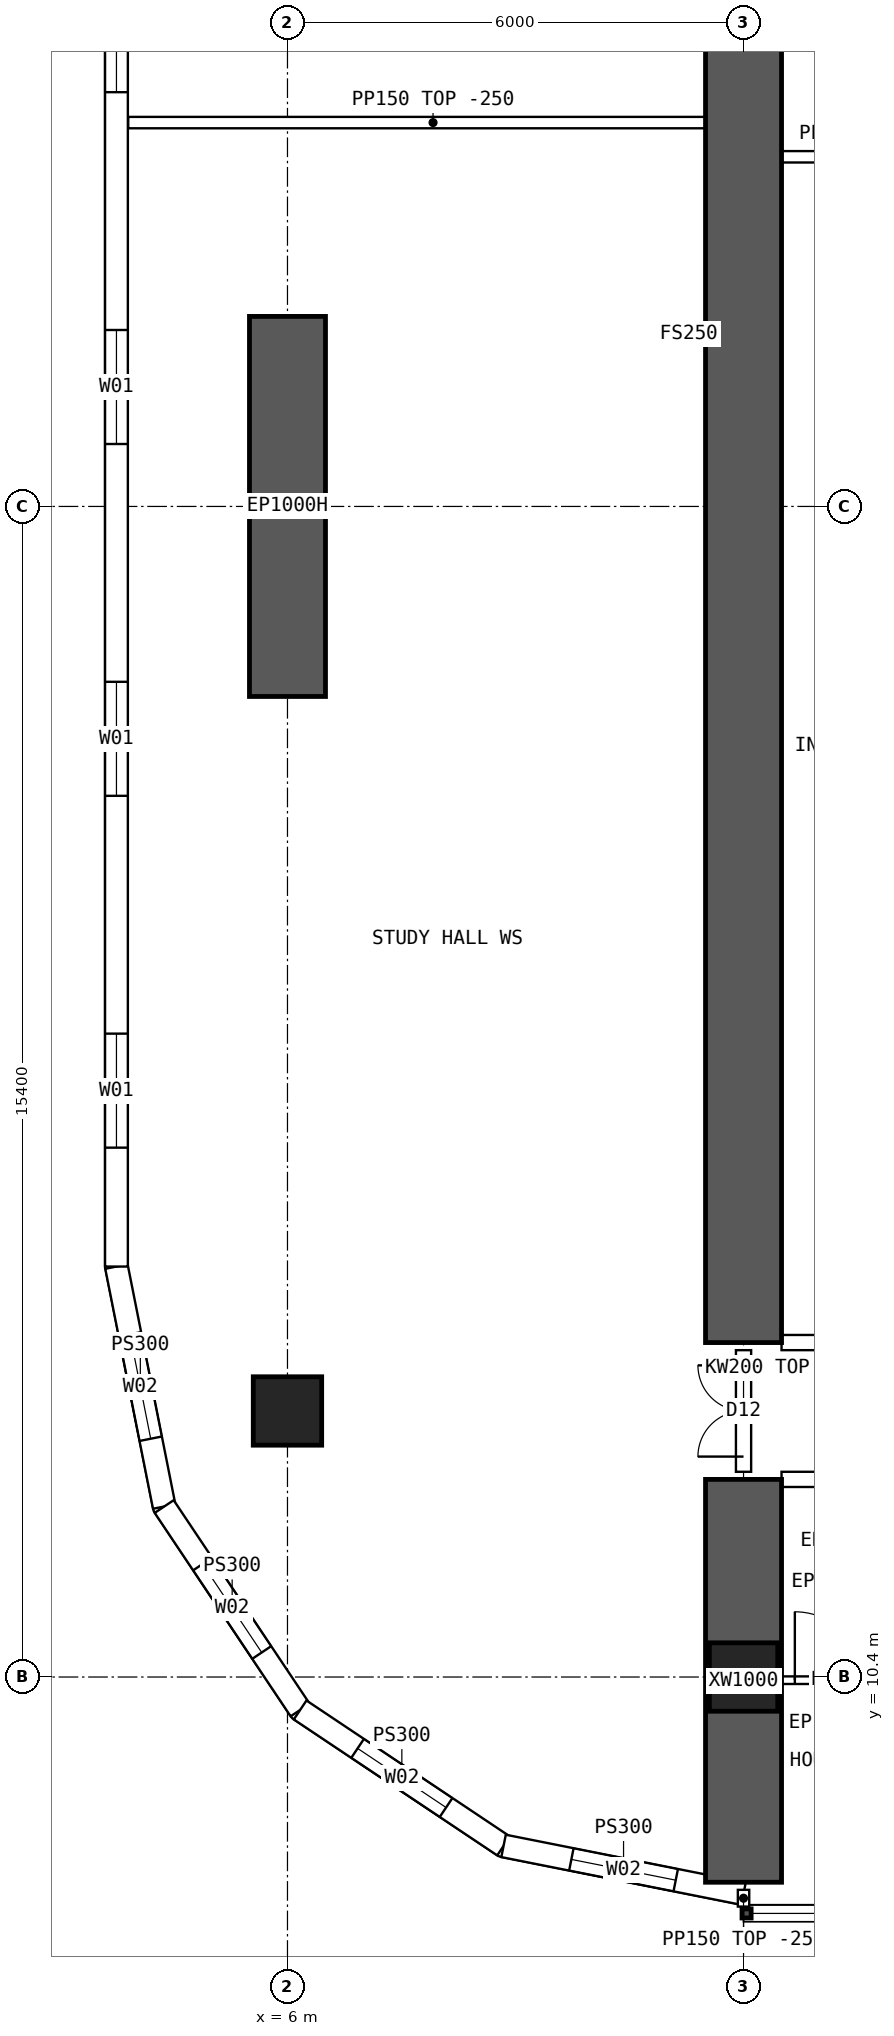
"""IFC4 building model, lengths in metres.
Left out: names, types, materials, properties, quantities, classifications, styles, units other than length and angle.
Written with IfcOpenShell. Run it as: python <this file> out.ifc"""

import sys

from ifc_helpers import new_model, si_unit, direction, frame, frame_2d, origin, origin_2d, place, context, subcontext, project, spatial, polyline, rectangle, hollow_rectangle, outline, extrude, element, fill, save


model = new_model("IFC4")
c1 = context("Model", 3, precision=1e-05, world=origin(), true_north=direction((0.0, 1.0)))
c2 = subcontext(c1, "Body", "Model", "MODEL_VIEW")
j1 = project(units=[si_unit("LENGTHUNIT", "METRE"), si_unit("PLANEANGLEUNIT", "RADIAN")], contexts=[c1])
p1 = place(None, origin())
s1 = spatial("IfcSite", under=j1, at=p1, CompositionType="ELEMENT")
p2 = place(p1, origin())
s2 = spatial("IfcBuilding", under=s1, at=p2, CompositionType="ELEMENT")
p3 = place(p2, frame((0.0, 0.0, 61.45)))
s3 = spatial("IfcBuildingStorey", under=s2, at=p3, CompositionType="ELEMENT", Elevation=61.45)
for number, where, z_axis, x_axis in (
    (1, (12.0, 10.4, 0.0), (0.0, 0.0, 1.0), (1.0, 0.0, 0.0)),
    (2, (6.0, 13.9, 0.0), (0.0, 0.0, 1.0), (1.0, 0.0, 0.0)),
):
    element("IfcColumn", number, at=place(p3, frame(where, z_axis=z_axis, x_axis=x_axis)), inside=s3, PredefinedType="COLUMN", context=c2, shape_type="SweptSolid", body=[
        extrude(hollow_rectangle(XDim=0.9, YDim=0.9, WallThickness=0.09, at=origin_2d()), origin(), (0.0, 0.0, 1.0), 3.75),
    ])
p4 = place(p3, frame((6.0, 23.3, 0.0), z_axis=(0.0, 0.0, 1.0), x_axis=(0.0, 1.0, 0.0)))
e3 = element("IfcWall", 3, at=p4, inside=s3, PredefinedType="SHEAR", context=c2, shape_type="SweptSolid", body=[
    extrude(rectangle(XDim=5.0, YDim=1.0, at=frame_2d((2.5, 0.0))), origin(), (0.0, 0.0, 1.0), 3.75),
])
p5 = place(p3, frame((12.0, 7.7, 0.0), z_axis=(0.0, 0.0, 1.0), x_axis=(0.0, 1.0, 0.0)))
e4 = element("IfcWall", 4, at=p5, inside=s3, PredefinedType="SHEAR", context=c2, shape_type="SweptSolid", body=[
    extrude(rectangle(XDim=5.3, YDim=1.0, at=frame_2d((2.65, 0.0))), origin(), (0.0, 0.0, 1.0), 3.75),
])
p6 = place(p3, frame((12.0, 14.8, 0.0), z_axis=(0.0, 0.0, 1.0), x_axis=(0.0, 1.0, 0.0)))
e5 = element("IfcWall", 5, at=p6, inside=s3, PredefinedType="SHEAR", context=c2, shape_type="SweptSolid", body=[
    extrude(rectangle(XDim=34.4, YDim=1.0, at=frame_2d((17.2, 0.0))), origin(), (0.0, 0.0, 1.0), 3.75),
])
p7 = place(p3, frame((3.75, 48.2, 0.0), z_axis=(0.0, 0.0, 1.0), x_axis=(0.0, -1.0, 0.0)))
e6 = element("IfcWall", 6, at=p7, inside=s3, PredefinedType="SOLIDWALL", context=c2, shape_type="SweptSolid", body=[
    extrude(outline(polyline([(-0.015, -0.15), (32.415, -0.15), (32.385, 0.15), (0.015, 0.15), (-0.015, -0.15)])), origin(), (0.0, 0.0, 1.0), 3.5),
])
p8 = place(p7, frame((1.564, 0.0, 0.9)))
e7 = element("IfcOpeningElement", 7, at=p8, cuts=e6, PredefinedType="OPENING", context=c2, shape_type="SweptSolid", body=[
    extrude(rectangle(XDim=1.5, YDim=2.0, at=frame_2d((0.75, 1.0))), frame((0.0, 0.16, 0.0), z_axis=(0.0, -1.0, 0.0), x_axis=(1.0, 0.0, 0.0)), (0.0, 0.0, 1.0), 0.32),
])
p9 = place(p7, frame((6.193, 0.0, 0.9)))
e8 = element("IfcOpeningElement", 8, at=p9, cuts=e6, PredefinedType="OPENING", context=c2, shape_type="SweptSolid", body=[
    extrude(rectangle(XDim=1.5, YDim=2.0, at=frame_2d((0.75, 1.0))), frame((0.0, 0.16, 0.0), z_axis=(0.0, -1.0, 0.0), x_axis=(1.0, 0.0, 0.0)), (0.0, 0.0, 1.0), 0.32),
])
p10 = place(p7, frame((10.822, 0.0, 0.9)))
e9 = element("IfcOpeningElement", 9, at=p10, cuts=e6, PredefinedType="OPENING", context=c2, shape_type="SweptSolid", body=[
    extrude(rectangle(XDim=1.5, YDim=2.0, at=frame_2d((0.75, 1.0))), frame((0.0, 0.16, 0.0), z_axis=(0.0, -1.0, 0.0), x_axis=(1.0, 0.0, 0.0)), (0.0, 0.0, 1.0), 0.32),
])
p11 = place(p7, frame((15.45, 0.0, 0.9)))
e10 = element("IfcOpeningElement", 10, at=p11, cuts=e6, PredefinedType="OPENING", context=c2, shape_type="SweptSolid", body=[
    extrude(rectangle(XDim=1.5, YDim=2.0, at=frame_2d((0.75, 1.0))), frame((0.0, 0.16, 0.0), z_axis=(0.0, -1.0, 0.0), x_axis=(1.0, 0.0, 0.0)), (0.0, 0.0, 1.0), 0.32),
])
p12 = place(p7, frame((20.079, 0.0, 0.9)))
e11 = element("IfcOpeningElement", 11, at=p12, cuts=e6, PredefinedType="OPENING", context=c2, shape_type="SweptSolid", body=[
    extrude(rectangle(XDim=1.5, YDim=2.0, at=frame_2d((0.75, 1.0))), frame((0.0, 0.16, 0.0), z_axis=(0.0, -1.0, 0.0), x_axis=(1.0, 0.0, 0.0)), (0.0, 0.0, 1.0), 0.32),
])
p13 = place(p7, frame((24.707, 0.0, 0.9)))
e12 = element("IfcOpeningElement", 12, at=p13, cuts=e6, PredefinedType="OPENING", context=c2, shape_type="SweptSolid", body=[
    extrude(rectangle(XDim=1.5, YDim=2.0, at=frame_2d((0.75, 1.0))), frame((0.0, 0.16, 0.0), z_axis=(0.0, -1.0, 0.0), x_axis=(1.0, 0.0, 0.0)), (0.0, 0.0, 1.0), 0.32),
])
p14 = place(p7, frame((29.336, 0.0, 0.9)))
e13 = element("IfcOpeningElement", 13, at=p14, cuts=e6, PredefinedType="OPENING", context=c2, shape_type="SweptSolid", body=[
    extrude(rectangle(XDim=1.5, YDim=2.0, at=frame_2d((0.75, 1.0))), frame((0.0, 0.16, 0.0), z_axis=(0.0, -1.0, 0.0), x_axis=(1.0, 0.0, 0.0)), (0.0, 0.0, 1.0), 0.32),
])
p15 = place(p3, frame((3.75, 15.8, 0.0), z_axis=(0.0, 0.0, 1.0), x_axis=(0.195065901187, -0.980790137692, 0.0)))
e14 = element("IfcWall", 14, at=p15, inside=s3, PredefinedType="SOLIDWALL", context=c2, shape_type="SweptSolid", body=[
    extrude(outline(polyline([(-0.015, -0.15), (3.249, -0.15), (3.189, 0.15), (0.015, 0.15), (-0.015, -0.15)])), origin(), (0.0, 0.0, 1.0), 3.5),
])
p16 = place(p15, frame((0.909, 0.0, 0.9)))
e15 = element("IfcOpeningElement", 15, at=p16, cuts=e14, PredefinedType="OPENING", context=c2, shape_type="SweptSolid", body=[
    extrude(rectangle(XDim=1.4, YDim=1.8, at=frame_2d((0.7, 0.9))), frame((0.0, 0.16, 0.0), z_axis=(0.0, -1.0, 0.0), x_axis=(1.0, 0.0, 0.0)), (0.0, 0.0, 1.0), 0.32),
])
p17 = place(p3, frame((4.378, 12.643, 0.0), z_axis=(0.0, 0.0, 1.0), x_axis=(0.555609954424, -0.831443069936, 0.0)))
e16 = element("IfcWall", 16, at=p17, inside=s3, PredefinedType="SOLIDWALL", context=c2, shape_type="SweptSolid", body=[
    extrude(outline(polyline([(-0.03, -0.15), (3.249, -0.15), (3.189, 0.15), (0.03, 0.15), (-0.03, -0.15)])), origin(), (0.0, 0.0, 1.0), 3.5),
])
p18 = place(p17, frame((0.909, 0.0, 0.9)))
e17 = element("IfcOpeningElement", 17, at=p18, cuts=e16, PredefinedType="OPENING", context=c2, shape_type="SweptSolid", body=[
    extrude(rectangle(XDim=1.4, YDim=1.8, at=frame_2d((0.7, 0.9))), frame((0.0, 0.16, 0.0), z_axis=(0.0, -1.0, 0.0), x_axis=(1.0, 0.0, 0.0)), (0.0, 0.0, 1.0), 0.32),
])
p19 = place(p3, frame((6.167, 9.966, 0.0), z_axis=(0.0, 0.0, 1.0), x_axis=(0.831478105043, -0.555557522525, 0.0)))
e18 = element("IfcWall", 18, at=p19, inside=s3, PredefinedType="SOLIDWALL", context=c2, shape_type="SweptSolid", body=[
    extrude(outline(polyline([(-0.03, -0.15), (3.249, -0.15), (3.189, 0.15), (0.03, 0.15), (-0.03, -0.15)])), origin(), (0.0, 0.0, 1.0), 3.5),
])
p20 = place(p19, frame((0.909, 0.0, 0.9)))
e19 = element("IfcOpeningElement", 19, at=p20, cuts=e18, PredefinedType="OPENING", context=c2, shape_type="SweptSolid", body=[
    extrude(rectangle(XDim=1.4, YDim=1.8, at=frame_2d((0.7, 0.9))), frame((0.0, 0.16, 0.0), z_axis=(0.0, -1.0, 0.0), x_axis=(1.0, 0.0, 0.0)), (0.0, 0.0, 1.0), 0.32),
])
p21 = place(p3, frame((8.843, 8.178, 0.0), z_axis=(0.0, 0.0, 1.0), x_axis=(0.980787251524, -0.195080412259, 0.0)))
e20 = element("IfcWall", 20, at=p21, inside=s3, PredefinedType="SOLIDWALL", context=c2, shape_type="SweptSolid", body=[
    extrude(outline(polyline([(-0.03, -0.15), (3.249, -0.15), (3.189, 0.15), (0.03, 0.15), (-0.03, -0.15)])), origin(), (0.0, 0.0, 1.0), 3.5),
])
p22 = place(p21, frame((0.909, 0.0, 0.9)))
e21 = element("IfcOpeningElement", 21, at=p22, cuts=e20, PredefinedType="OPENING", context=c2, shape_type="SweptSolid", body=[
    extrude(rectangle(XDim=1.4, YDim=1.8, at=frame_2d((0.7, 0.9))), frame((0.0, 0.16, 0.0), z_axis=(0.0, -1.0, 0.0), x_axis=(1.0, 0.0, 0.0)), (0.0, 0.0, 1.0), 0.32),
])
p23 = place(p3, frame((12.5, 13.0, 0.0), z_axis=(0.0, 0.0, 1.0), x_axis=(1.0, 0.0, 0.0)))
e22 = element("IfcWall", 22, at=p23, inside=s3, PredefinedType="SOLIDWALL", context=c2, shape_type="SweptSolid", body=[
    extrude(outline(polyline([(0.0, 0.0), (5.0, 0.0), (5.0, 3.1), (0.0, 3.1), (0.0, 0.0)])), frame((0.0, 0.1, 0.0), z_axis=(0.0, -1.0, 0.0), x_axis=(1.0, 0.0, 0.0)), (0.0, 0.0, 1.0), 0.2),
])
p24 = place(p23, frame((1.3, 0.0, 0.0)))
e23 = element("IfcOpeningElement", 23, at=p24, cuts=e22, PredefinedType="OPENING", context=c2, shape_type="SweptSolid", body=[
    extrude(rectangle(XDim=0.9, YDim=2.1, at=frame_2d((0.45, 1.05))), frame((0.0, 0.11, 0.0), z_axis=(0.0, -1.0, 0.0), x_axis=(1.0, 0.0, 0.0)), (0.0, 0.0, 1.0), 0.22),
])
p25 = place(p23, frame((2.675, 0.0, 0.0)))
e24 = element("IfcOpeningElement", 24, at=p25, cuts=e22, PredefinedType="OPENING", context=c2, shape_type="SweptSolid", body=[
    extrude(rectangle(XDim=0.9, YDim=2.1, at=frame_2d((0.45, 1.05))), frame((0.0, 0.11, 0.0), z_axis=(0.0, -1.0, 0.0), x_axis=(1.0, 0.0, 0.0)), (0.0, 0.0, 1.0), 0.22),
])
p26 = place(p3, frame((12.5, 14.8, 0.0), z_axis=(0.0, 0.0, 1.0), x_axis=(1.0, 0.0, 0.0)))
e25 = element("IfcWall", 25, at=p26, inside=s3, PredefinedType="SOLIDWALL", context=c2, shape_type="SweptSolid", body=[
    extrude(rectangle(XDim=5.0, YDim=0.2, at=frame_2d((2.5, 0.0))), origin(), (0.0, 0.0, 1.0), 3.5),
])
p27 = place(p26, frame((3.3, 0.0, 0.0)))
e26 = element("IfcOpeningElement", 26, at=p27, cuts=e25, PredefinedType="OPENING", context=c2, shape_type="SweptSolid", body=[
    extrude(rectangle(XDim=1.6, YDim=2.1, at=frame_2d((0.8, 1.05))), frame((0.0, 0.11, 0.0), z_axis=(0.0, -1.0, 0.0), x_axis=(1.0, 0.0, 0.0)), (0.0, 0.0, 1.0), 0.22),
])
p28 = place(p3, frame((13.75, 10.358, 0.0), z_axis=(0.0, 0.0, 1.0), x_axis=(-1.0, 0.0, 0.0)))
e27 = element("IfcWall", 27, at=p28, inside=s3, PredefinedType="PARTITIONING", context=c2, shape_type="SweptSolid", body=[
    extrude(outline(polyline([(0.0, 0.0), (1.3, 0.0), (1.3, 3.1), (0.0, 3.1), (0.0, 0.0)])), frame((0.0, 0.05, 0.0), z_axis=(0.0, -1.0, 0.0), x_axis=(1.0, 0.0, 0.0)), (0.0, 0.0, 1.0), 0.1),
])
p29 = place(p28, frame((0.175, 0.0, 0.0)))
e28 = element("IfcOpeningElement", 28, at=p29, cuts=e27, PredefinedType="OPENING", context=c2, shape_type="SweptSolid", body=[
    extrude(rectangle(XDim=0.9, YDim=2.1, at=frame_2d((0.45, 1.05))), frame((0.0, 0.06, 0.0), z_axis=(0.0, -1.0, 0.0), x_axis=(1.0, 0.0, 0.0)), (0.0, 0.0, 1.0), 0.12),
])
p30 = place(p3, frame((12.0, 30.4, 0.0), z_axis=(0.0, 0.0, 1.0), x_axis=(1.0, 0.0, 0.0)))
e29 = element("IfcWall", 29, at=p30, inside=s3, PredefinedType="PARTITIONING", context=c2, shape_type="SweptSolid", body=[
    extrude(rectangle(XDim=3.6, YDim=0.15, at=frame_2d((1.8, 0.0))), origin(), (0.0, 0.0, 1.0), 3.5),
])
p31 = place(p3, frame((3.905, 30.85, 0.0), z_axis=(0.0, 0.0, 1.0), x_axis=(1.0, 0.0, 0.0)))
e30 = element("IfcWall", 30, at=p31, inside=s3, PredefinedType="PARTITIONING", context=c2, shape_type="SweptSolid", body=[
    extrude(outline(polyline([(0.0, 0.0), (8.02, 0.0), (8.02, 3.5), (2.397, 3.5), (2.395, 3.05), (1.797, 3.05), (1.795, 3.5), (0.0, 3.5), (0.0, 0.0)])), frame((0.0, 0.075, 0.0), z_axis=(0.0, -1.0, 0.0), x_axis=(1.0, 0.0, 0.0)), (0.0, 0.0, 1.0), 0.15),
])
p32 = place(p3, frame((12.0, 13.1, 0.0), z_axis=(0.0, 0.0, 1.0), x_axis=(0.0, 1.0, 0.0)))
e31 = element("IfcWall", 31, at=p32, inside=s3, PredefinedType="SOLIDWALL", context=c2, shape_type="SweptSolid", body=[
    extrude(outline(polyline([(0.0, 0.0), (1.6, 0.0), (1.6, 3.05), (0.0, 3.05), (0.0, 0.0)])), frame((0.0, 0.1, 0.0), z_axis=(0.0, -1.0, 0.0), x_axis=(1.0, 0.0, 0.0)), (0.0, 0.0, 1.0), 0.2),
])
p33 = place(p32, frame((0.2, 0.0, 0.0)))
e32 = element("IfcOpeningElement", 32, at=p33, cuts=e31, PredefinedType="OPENING", context=c2, shape_type="SweptSolid", body=[
    extrude(rectangle(XDim=1.2, YDim=2.1, at=frame_2d((0.6, 1.05))), frame((0.0, 0.11, 0.0), z_axis=(0.0, -1.0, 0.0), x_axis=(1.0, 0.0, 0.0)), (0.0, 0.0, 1.0), 0.22),
])
p34 = place(p3, frame((12.0, 7.6, 0.0), z_axis=(0.0, 0.0, 1.0), x_axis=(0.0, -1.0, 0.0)))
e33 = element("IfcWall", 33, at=p34, inside=s3, PredefinedType="PARTITIONING", context=c2, shape_type="SweptSolid", body=[
    extrude(rectangle(XDim=0.22, YDim=0.15, at=frame_2d((0.11, 0.0))), origin(), (0.0, 0.0, 1.0), 3.5),
])
p35 = place(p11, origin())
e34 = element("IfcWindow", 34, at=p35, inside=s3, PartitioningType="SINGLE_PANEL", PredefinedType="WINDOW", context=c2, shape_type="SweptSolid", body=[
    extrude(rectangle(XDim=1.5, YDim=2.0, at=frame_2d((0.75, 1.0))), frame((0.0, 0.03, 0.0), z_axis=(0.0, -1.0, 0.0), x_axis=(1.0, 0.0, 0.0)), (0.0, 0.0, 1.0), 0.06),
])
fill(e10, e34)
p36 = place(p12, origin())
e35 = element("IfcWindow", 35, at=p36, inside=s3, PartitioningType="SINGLE_PANEL", PredefinedType="WINDOW", context=c2, shape_type="SweptSolid", body=[
    extrude(rectangle(XDim=1.5, YDim=2.0, at=frame_2d((0.75, 1.0))), frame((0.0, 0.03, 0.0), z_axis=(0.0, -1.0, 0.0), x_axis=(1.0, 0.0, 0.0)), (0.0, 0.0, 1.0), 0.06),
])
fill(e11, e35)
p37 = place(p13, origin())
e36 = element("IfcWindow", 36, at=p37, inside=s3, PartitioningType="SINGLE_PANEL", PredefinedType="WINDOW", context=c2, shape_type="SweptSolid", body=[
    extrude(rectangle(XDim=1.5, YDim=2.0, at=frame_2d((0.75, 1.0))), frame((0.0, 0.03, 0.0), z_axis=(0.0, -1.0, 0.0), x_axis=(1.0, 0.0, 0.0)), (0.0, 0.0, 1.0), 0.06),
])
fill(e12, e36)
p38 = place(p14, origin())
e37 = element("IfcWindow", 37, at=p38, inside=s3, PartitioningType="SINGLE_PANEL", PredefinedType="WINDOW", context=c2, shape_type="SweptSolid", body=[
    extrude(rectangle(XDim=1.5, YDim=2.0, at=frame_2d((0.75, 1.0))), frame((0.0, 0.03, 0.0), z_axis=(0.0, -1.0, 0.0), x_axis=(1.0, 0.0, 0.0)), (0.0, 0.0, 1.0), 0.06),
])
fill(e13, e37)
p39 = place(p16, origin())
e38 = element("IfcWindow", 38, at=p39, inside=s3, PartitioningType="SINGLE_PANEL", PredefinedType="WINDOW", context=c2, shape_type="SweptSolid", body=[
    extrude(rectangle(XDim=1.4, YDim=1.8, at=frame_2d((0.7, 0.9))), frame((0.0, 0.03, 0.0), z_axis=(0.0, -1.0, 0.0), x_axis=(1.0, 0.0, 0.0)), (0.0, 0.0, 1.0), 0.06),
])
fill(e15, e38)
p40 = place(p18, origin())
e39 = element("IfcWindow", 39, at=p40, inside=s3, PartitioningType="SINGLE_PANEL", PredefinedType="WINDOW", context=c2, shape_type="SweptSolid", body=[
    extrude(rectangle(XDim=1.4, YDim=1.8, at=frame_2d((0.7, 0.9))), frame((0.0, 0.03, 0.0), z_axis=(0.0, -1.0, 0.0), x_axis=(1.0, 0.0, 0.0)), (0.0, 0.0, 1.0), 0.06),
])
fill(e17, e39)
p41 = place(p20, origin())
e40 = element("IfcWindow", 40, at=p41, inside=s3, PartitioningType="SINGLE_PANEL", PredefinedType="WINDOW", context=c2, shape_type="SweptSolid", body=[
    extrude(rectangle(XDim=1.4, YDim=1.8, at=frame_2d((0.7, 0.9))), frame((0.0, 0.03, 0.0), z_axis=(0.0, -1.0, 0.0), x_axis=(1.0, 0.0, 0.0)), (0.0, 0.0, 1.0), 0.06),
])
fill(e19, e40)
p42 = place(p22, origin())
e41 = element("IfcWindow", 41, at=p42, inside=s3, PartitioningType="SINGLE_PANEL", PredefinedType="WINDOW", context=c2, shape_type="SweptSolid", body=[
    extrude(rectangle(XDim=1.4, YDim=1.8, at=frame_2d((0.7, 0.9))), frame((0.0, 0.03, 0.0), z_axis=(0.0, -1.0, 0.0), x_axis=(1.0, 0.0, 0.0)), (0.0, 0.0, 1.0), 0.06),
])
fill(e21, e41)
p43 = place(p29, origin())
e42 = element("IfcDoor", 42, at=p43, inside=s3, OperationType="SINGLE_SWING_RIGHT", PredefinedType="DOOR", context=c2, shape_type="SweptSolid", body=[
    extrude(rectangle(XDim=0.9, YDim=2.1, at=frame_2d((0.45, 1.05))), frame((0.0, 0.025, 0.0), z_axis=(0.0, -1.0, 0.0), x_axis=(1.0, 0.0, 0.0)), (0.0, 0.0, 1.0), 0.05),
])
fill(e28, e42)
p44 = place(p33, origin())
e43 = element("IfcDoor", 43, at=p44, inside=s3, OperationType="DOUBLE_DOOR_SINGLE_SWING", PredefinedType="DOOR", context=c2, shape_type="SweptSolid", body=[
    extrude(rectangle(XDim=1.2, YDim=2.1, at=frame_2d((0.6, 1.05))), frame((0.0, 0.025, 0.0), z_axis=(0.0, -1.0, 0.0), x_axis=(1.0, 0.0, 0.0)), (0.0, 0.0, 1.0), 0.05),
])
fill(e32, e43)
save(model, sys.argv[1])
